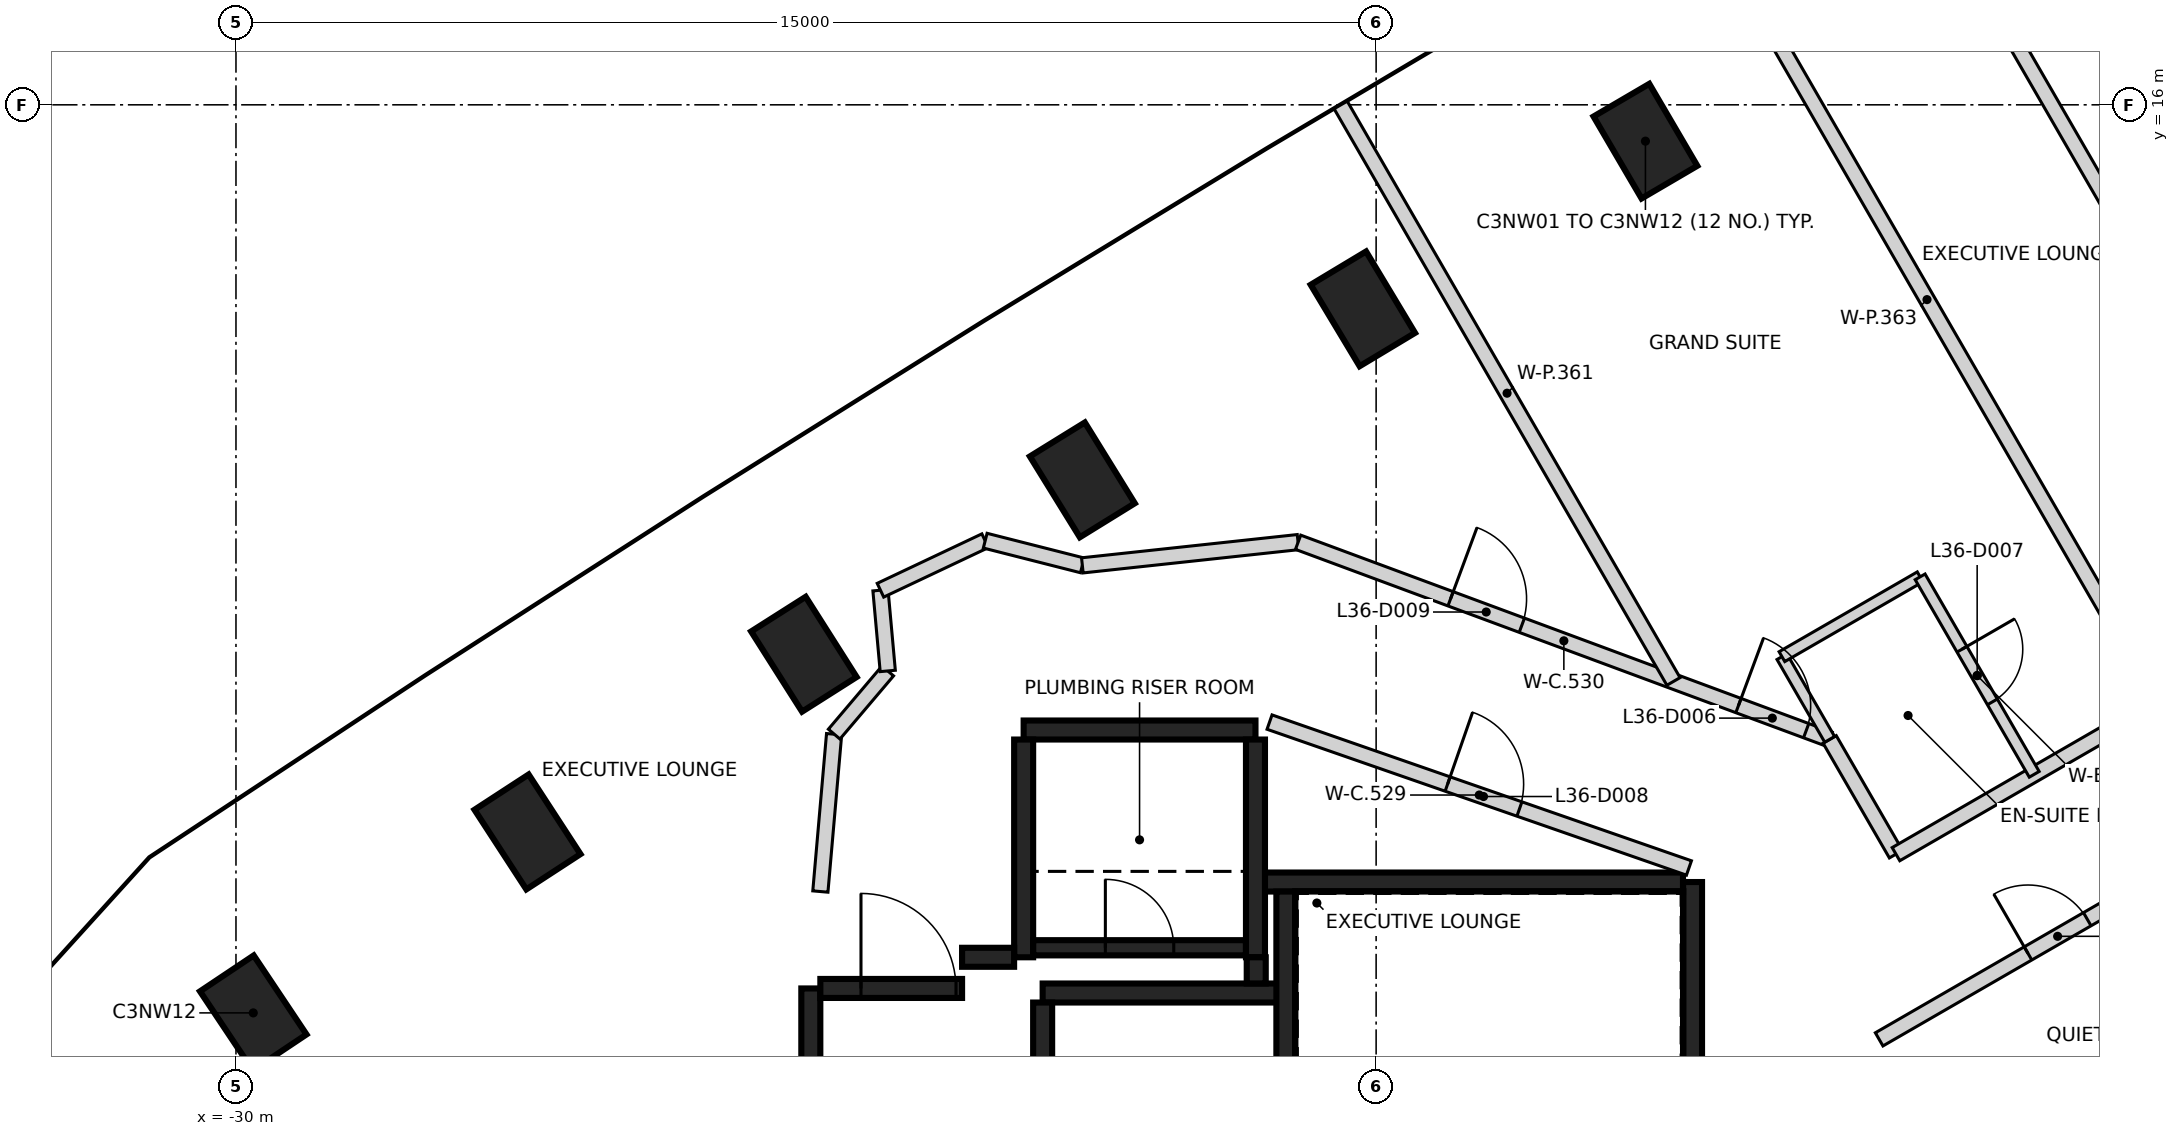
"""IFC4 building model, lengths in metres.
Left out: names, types, materials, properties, quantities, classifications, styles, units other than length and angle.
Written with IfcOpenShell. Run it as: python <this file> out.ifc"""

import sys

from ifc_helpers import new_model, si_unit, direction, frame, frame_2d, origin, origin_2d, place, context, subcontext, project, spatial, rectangle, extrude, element, fill, save


model = new_model("IFC4")
c1 = context("Model", 3, precision=1e-05, world=origin(), true_north=direction((0.0, 1.0)))
c2 = subcontext(c1, "Body", "Model", "MODEL_VIEW")
j1 = project(units=[si_unit("LENGTHUNIT", "METRE"), si_unit("PLANEANGLEUNIT", "RADIAN")], contexts=[c1])
p1 = place(None, origin())
s1 = spatial("IfcSite", under=j1, at=p1, CompositionType="ELEMENT")
p2 = place(p1, origin())
s2 = spatial("IfcBuilding", under=s1, at=p2, CompositionType="ELEMENT")
p3 = place(p2, frame((0.0, 0.0, 146.8)))
s3 = spatial("IfcBuildingStorey", under=s2, at=p3, CompositionType="ELEMENT", Elevation=146.8)
for number, where, z_axis, x_axis in (
    (1, (-11.457, 15.522, -0.4), (0.0, 0.0, 1.0), (-0.505, 0.863, 0.0)),
    (2, (-15.175, 13.316, -0.4), (0.0, 0.0, 1.0), (-0.515, 0.857, 0.0)),
    (3, (-18.865, 11.066, -0.4), (0.0, 0.0, 1.0), (-0.526, 0.851, 0.0)),
    (4, (-22.529, 8.772, -0.4), (0.0, 0.0, 1.0), (-0.536, 0.844, 0.0)),
    (5, (-26.165, 6.434, -0.4), (0.0, 0.0, 1.0), (-0.546, 0.838, 0.0)),
    (6, (-29.773, 4.053, -0.4), (0.0, 0.0, 1.0), (-0.556, 0.831, 0.0)),
):
    element("IfcColumn", number, at=place(p3, frame(where, z_axis=z_axis, x_axis=x_axis)), inside=s3, PredefinedType="COLUMN", context=c2, shape_type="SweptSolid", body=[
        extrude(rectangle(XDim=1.25, YDim=0.85, at=origin_2d()), origin(), (0.0, 0.0, 1.0), 3.6),
    ])
p4 = place(p3, frame((-10.837, 5.775, 0.0), z_axis=(0.0, 0.0, 1.0), x_axis=(0.0, -1.0, 0.0)))
e7 = element("IfcWall", 7, at=p4, inside=s3, PredefinedType="SHEAR", context=c2, shape_type="SweptSolid", body=[
    extrude(rectangle(XDim=11.55, YDim=0.25, at=frame_2d((5.775, 0.0))), origin(), (0.0, 0.0, 1.0), 3.2),
])
p5 = place(p4, frame((10.025, 0.0, 0.0)))
e8 = element("IfcOpeningElement", 8, at=p5, cuts=e7, PredefinedType="OPENING", context=c2, shape_type="SweptSolid", body=[
    extrude(rectangle(XDim=1.2, YDim=2.1, at=frame_2d((0.6, 1.05))), frame((0.0, 0.135, 0.0), z_axis=(0.0, -1.0, 0.0), x_axis=(1.0, 0.0, 0.0)), (0.0, 0.0, 1.0), 0.27),
])
p6 = place(p4, frame((8.725, 0.0, 0.0)))
e9 = element("IfcOpeningElement", 9, at=p6, cuts=e7, PredefinedType="OPENING", context=c2, shape_type="SweptSolid", body=[
    extrude(rectangle(XDim=1.2, YDim=2.1, at=frame_2d((0.6, 1.05))), frame((0.0, 0.135, 0.0), z_axis=(0.0, -1.0, 0.0), x_axis=(1.0, 0.0, 0.0)), (0.0, 0.0, 1.0), 0.27),
])
p7 = place(p3, frame((-16.472, 5.775, 0.0), z_axis=(0.0, 0.0, 1.0), x_axis=(1.0, 0.0, 0.0)))
e10 = element("IfcWall", 10, at=p7, inside=s3, PredefinedType="SHEAR", context=c2, shape_type="SweptSolid", body=[
    extrude(rectangle(XDim=5.51, YDim=0.25, at=frame_2d((2.755, 0.0))), origin(), (0.0, 0.0, 1.0), 3.2),
])
p8 = place(p3, frame((-19.637, 7.775, 0.0), z_axis=(0.0, 0.0, 1.0), x_axis=(1.0, 0.0, 0.0)))
e11 = element("IfcWall", 11, at=p8, inside=s3, PredefinedType="SHEAR", context=c2, shape_type="SweptSolid", body=[
    extrude(rectangle(XDim=3.05, YDim=0.25, at=frame_2d((1.525, 0.0))), origin(), (0.0, 0.0, 1.0), 3.2),
])
for number, where, z_axis, x_axis in (
    (12, (-16.587, 7.65, 0.0), (0.0, 0.0, 1.0), (0.0, -1.0, 0.0)),
    (13, (-19.637, 4.785, 0.0), (0.0, 0.0, 1.0), (0.0, 1.0, 0.0)),
):
    element("IfcWall", number, at=place(p3, frame(where, z_axis=z_axis, x_axis=x_axis)), inside=s3, PredefinedType="SHEAR", context=c2, shape_type="SweptSolid", body=[
        extrude(rectangle(XDim=2.865, YDim=0.25, at=frame_2d((1.432, 0.0))), origin(), (0.0, 0.0, 1.0), 3.2),
    ])
p9 = place(p3, frame((-16.302, 4.315, 0.0), z_axis=(0.0, 0.0, 1.0), x_axis=(-1.0, 0.0, 0.0)))
e14 = element("IfcWall", 14, at=p9, inside=s3, PredefinedType="SHEAR", context=c2, shape_type="SweptSolid", body=[
    extrude(rectangle(XDim=3.085, YDim=0.25, at=frame_2d((1.542, 0.0))), origin(), (0.0, 0.0, 1.0), 3.2),
])
p10 = place(p3, frame((-16.187, 3.2, 0.0), z_axis=(0.0, 0.0, 1.0), x_axis=(0.0, 1.0, 0.0)))
e15 = element("IfcWall", 15, at=p10, inside=s3, PredefinedType="SHEAR", context=c2, shape_type="SweptSolid", body=[
    extrude(rectangle(XDim=2.449, YDim=0.25, at=frame_2d((1.225, 0.0))), origin(), (0.0, 0.0, 1.0), 3.2),
])
p11 = place(p3, frame((-22.437, 2.4, 0.0), z_axis=(0.0, 0.0, 1.0), x_axis=(0.0, 1.0, 0.0)))
e16 = element("IfcWall", 16, at=p11, inside=s3, PredefinedType="SHEAR", context=c2, shape_type="SweptSolid", body=[
    extrude(rectangle(XDim=1.975, YDim=0.25, at=frame_2d((0.987, 0.0))), origin(), (0.0, 0.0, 1.0), 3.2),
])
p12 = place(p3, frame((-22.312, 4.375, 0.0), z_axis=(0.0, 0.0, 1.0), x_axis=(1.0, 0.0, 0.0)))
e17 = element("IfcWall", 17, at=p12, inside=s3, PredefinedType="SHEAR", context=c2, shape_type="SweptSolid", body=[
    extrude(rectangle(XDim=1.865, YDim=0.25, at=frame_2d((0.932, 0.0))), origin(), (0.0, 0.0, 1.0), 3.2),
])
p13 = place(p12, frame((0.535, 0.0, 0.0)))
e18 = element("IfcOpeningElement", 18, at=p13, cuts=e17, PredefinedType="OPENING", context=c2, shape_type="SweptSolid", body=[
    extrude(rectangle(XDim=1.25, YDim=2.1, at=frame_2d((0.625, 1.05))), frame((0.0, 0.135, 0.0), z_axis=(0.0, -1.0, 0.0), x_axis=(1.0, 0.0, 0.0)), (0.0, 0.0, 1.0), 0.27),
])
p14 = place(p3, frame((-19.387, 4.19, 0.0), z_axis=(0.0, 0.0, 1.0), x_axis=(0.0, -1.0, 0.0)))
e19 = element("IfcWall", 19, at=p14, inside=s3, PredefinedType="SHEAR", context=c2, shape_type="SweptSolid", body=[
    extrude(rectangle(XDim=0.989, YDim=0.25, at=frame_2d((0.495, 0.0))), origin(), (0.0, 0.0, 1.0), 3.2),
])
p15 = place(p3, frame((-20.447, 4.785, 0.0), z_axis=(0.0, 0.0, 1.0), x_axis=(1.0, 0.0, 0.0)))
e20 = element("IfcWall", 20, at=p15, inside=s3, PredefinedType="SHEAR", context=c2, shape_type="SweptSolid", body=[
    extrude(rectangle(XDim=0.685, YDim=0.25, at=frame_2d((0.342, 0.0))), origin(), (0.0, 0.0, 1.0), 3.2),
])
p16 = place(p3, frame((-16.577, 4.785, 0.0), z_axis=(0.0, 0.0, 1.0), x_axis=(0.0, -1.0, 0.0)))
e21 = element("IfcWall", 21, at=p16, inside=s3, PredefinedType="SHEAR", context=c2, shape_type="SweptSolid", body=[
    extrude(rectangle(XDim=0.344, YDim=0.25, at=frame_2d((0.172, 0.0))), origin(), (0.0, 0.0, 1.0), 3.2),
])
p17 = place(p3, frame((-19.511, 4.91, 0.0), z_axis=(0.0, 0.0, 1.0), x_axis=(1.0, 0.0, 0.0)))
e22 = element("IfcWall", 22, at=p17, inside=s3, PredefinedType="SHEAR", context=c2, shape_type="SweptSolid", body=[
    extrude(rectangle(XDim=2.798, YDim=0.2, at=frame_2d((1.399, 0.0))), origin(), (0.0, 0.0, 1.0), 3.2),
])
p18 = place(p17, frame((0.949, 0.0, 0.0)))
e23 = element("IfcOpeningElement", 23, at=p18, cuts=e22, PredefinedType="OPENING", context=c2, shape_type="SweptSolid", body=[
    extrude(rectangle(XDim=0.9, YDim=2.1, at=frame_2d((0.45, 1.05))), frame((0.0, 0.11, 0.0), z_axis=(0.0, -1.0, 0.0), x_axis=(1.0, 0.0, 0.0)), (0.0, 0.0, 1.0), 0.22),
])
p19 = place(p3, frame((-22.131, 7.72, 0.0), z_axis=(0.0, 0.0, 1.0), x_axis=(-0.086827346826, -0.996223374471, 0.0)))
e24 = element("IfcWall", 24, at=p19, inside=s3, PredefinedType="PARTITIONING", context=c2, shape_type="SweptSolid", body=[
    extrude(rectangle(XDim=2.078, YDim=0.2, at=frame_2d((1.039, 0.0))), origin(), (0.0, 0.0, 1.0), 3.2),
])
p20 = place(p3, frame((-22.13, 7.721, 0.0), z_axis=(0.0, 0.0, 1.0), x_axis=(0.646815590698, 0.762646439466, 0.0)))
e25 = element("IfcWall", 25, at=p20, inside=s3, PredefinedType="PARTITIONING", context=c2, shape_type="SweptSolid", body=[
    extrude(rectangle(XDim=1.09, YDim=0.2, at=frame_2d((0.545, 0.0))), origin(), (0.0, 0.0, 1.0), 3.2),
])
p21 = place(p3, frame((-21.521, 9.614, 0.0), z_axis=(0.0, 0.0, 1.0), x_axis=(0.089978363699, -0.995943720331, 0.0)))
e26 = element("IfcWall", 26, at=p21, inside=s3, PredefinedType="PARTITIONING", context=c2, shape_type="SweptSolid", body=[
    extrude(rectangle(XDim=1.066, YDim=0.2, at=frame_2d((0.533, 0.0))), origin(), (0.0, 0.0, 1.0), 2.3),
])
p22 = place(p3, frame((-21.521, 9.614, 0.0), z_axis=(0.0, 0.0, 1.0), x_axis=(0.904083527367, 0.427355795028, 0.0)))
e27 = element("IfcWall", 27, at=p22, inside=s3, PredefinedType="PARTITIONING", context=c2, shape_type="SweptSolid", body=[
    extrude(rectangle(XDim=1.523, YDim=0.2, at=frame_2d((0.761, 0.0))), origin(), (0.0, 0.0, 1.0), 2.3),
])
p23 = place(p3, frame((-20.143, 10.266, 0.0), z_axis=(0.0, 0.0, 1.0), x_axis=(0.969121308325, -0.246584447505, 0.0)))
e28 = element("IfcWall", 28, at=p23, inside=s3, PredefinedType="PARTITIONING", context=c2, shape_type="SweptSolid", body=[
    extrude(rectangle(XDim=1.319, YDim=0.2, at=frame_2d((0.659, 0.0))), origin(), (0.0, 0.0, 1.0), 2.3),
])
p24 = place(p3, frame((-18.865, 9.941, 0.0), z_axis=(0.0, 0.0, 1.0), x_axis=(0.99423123086, 0.107257911519, 0.0)))
e29 = element("IfcWall", 29, at=p24, inside=s3, PredefinedType="PARTITIONING", context=c2, shape_type="SweptSolid", body=[
    extrude(rectangle(XDim=2.854, YDim=0.2, at=frame_2d((1.427, 0.0))), origin(), (0.0, 0.0, 1.0), 3.2),
])
p25 = place(p3, frame((-16.402, 7.879, 0.0), z_axis=(0.0, 0.0, 1.0), x_axis=(0.94449961557, -0.328512520596, 0.0)))
e30 = element("IfcWall", 30, at=p25, inside=s3, PredefinedType="PARTITIONING", context=c2, shape_type="SweptSolid", body=[
    extrude(rectangle(XDim=5.842, YDim=0.2, at=frame_2d((2.921, 0.0))), origin(), (0.0, 0.0, 1.0), 3.2),
])
p26 = place(p25, frame((2.481, 0.0, 0.0)))
e31 = element("IfcOpeningElement", 31, at=p26, cuts=e30, PredefinedType="OPENING", context=c2, shape_type="SweptSolid", body=[
    extrude(rectangle(XDim=1.0, YDim=2.1, at=frame_2d((0.5, 1.05))), frame((0.0, 0.11, 0.0), z_axis=(0.0, -1.0, 0.0), x_axis=(1.0, 0.0, 0.0)), (0.0, 0.0, 1.0), 0.22),
])
p27 = place(p3, frame((-16.026, 10.245, 0.0), z_axis=(0.0, 0.0, 1.0), x_axis=(0.937607706988, -0.347694963721, 0.0)))
e32 = element("IfcWall", 32, at=p27, inside=s3, PredefinedType="PARTITIONING", context=c2, shape_type="SweptSolid", body=[
    extrude(rectangle(XDim=7.458, YDim=0.2, at=frame_2d((3.729, 0.0))), origin(), (0.0, 0.0, 1.0), 3.2),
])
p28 = place(p27, frame((6.179, 0.0, 0.0)))
e33 = element("IfcOpeningElement", 33, at=p28, cuts=e32, PredefinedType="OPENING", context=c2, shape_type="SweptSolid", body=[
    extrude(rectangle(XDim=0.95, YDim=2.1, at=frame_2d((0.475, 1.05))), frame((0.0, 0.11, 0.0), z_axis=(0.0, -1.0, 0.0), x_axis=(1.0, 0.0, 0.0)), (0.0, 0.0, 1.0), 0.22),
])
p29 = place(p27, frame((2.139, 0.0, 0.0)))
e34 = element("IfcOpeningElement", 34, at=p29, cuts=e32, PredefinedType="OPENING", context=c2, shape_type="SweptSolid", body=[
    extrude(rectangle(XDim=1.0, YDim=2.1, at=frame_2d((0.5, 1.05))), frame((0.0, 0.11, 0.0), z_axis=(0.0, -1.0, 0.0), x_axis=(1.0, 0.0, 0.0)), (0.0, 0.0, 1.0), 0.22),
])
p30 = place(p3, frame((-9.033, 7.651, 0.0), z_axis=(0.0, 0.0, 1.0), x_axis=(0.500417633986, -0.865784148386, 0.0)))
e35 = element("IfcWall", 35, at=p30, inside=s3, PredefinedType="PARTITIONING", context=c2, shape_type="SweptSolid", body=[
    extrude(rectangle(XDim=1.743, YDim=0.2, at=frame_2d((0.871, 0.0))), origin(), (0.0, 0.0, 1.0), 3.2),
])
p31 = place(p3, frame((-8.382, 3.705, 0.0), z_axis=(0.0, 0.0, 1.0), x_axis=(0.866012036978, 0.500023151273, 0.0)))
e36 = element("IfcWall", 36, at=p31, inside=s3, PredefinedType="PARTITIONING", context=c2, shape_type="SweptSolid", body=[
    extrude(rectangle(XDim=10.823, YDim=0.2, at=frame_2d((5.412, 0.0))), origin(), (0.0, 0.0, 1.0), 3.2),
])
p32 = place(p31, frame((7.661, 0.0, 0.0)))
e37 = element("IfcOpeningElement", 37, at=p32, cuts=e36, PredefinedType="OPENING", context=c2, shape_type="SweptSolid", body=[
    extrude(rectangle(XDim=0.9, YDim=2.1, at=frame_2d((0.45, 1.05))), frame((0.0, 0.11, 0.0), z_axis=(0.0, -1.0, 0.0), x_axis=(1.0, 0.0, 0.0)), (0.0, 0.0, 1.0), 0.22),
])
p33 = place(p31, frame((2.261, 0.0, 0.0)))
e38 = element("IfcOpeningElement", 38, at=p33, cuts=e36, PredefinedType="OPENING", context=c2, shape_type="SweptSolid", body=[
    extrude(rectangle(XDim=0.9, YDim=2.1, at=frame_2d((0.45, 1.05))), frame((0.0, 0.11, 0.0), z_axis=(0.0, -1.0, 0.0), x_axis=(1.0, 0.0, 0.0)), (0.0, 0.0, 1.0), 0.22),
])
p34 = place(p3, frame((-8.161, 6.142, 0.0), z_axis=(0.0, 0.0, 1.0), x_axis=(0.865927304867, 0.500169873828, 0.0)))
e39 = element("IfcWall", 39, at=p34, inside=s3, PredefinedType="PARTITIONING", context=c2, shape_type="SweptSolid", body=[
    extrude(rectangle(XDim=9.478, YDim=0.2, at=frame_2d((4.739, 0.0))), origin(), (0.0, 0.0, 1.0), 3.2),
])
p35 = place(p34, frame((4.851, 0.0, 0.0)))
e40 = element("IfcOpeningElement", 40, at=p35, cuts=e39, PredefinedType="OPENING", context=c2, shape_type="SweptSolid", body=[
    extrude(rectangle(XDim=1.0, YDim=2.1, at=frame_2d((0.5, 1.05))), frame((0.0, 0.11, 0.0), z_axis=(0.0, -1.0, 0.0), x_axis=(1.0, 0.0, 0.0)), (0.0, 0.0, 1.0), 0.22),
])
p36 = place(p34, frame((7.583, 0.0, 0.0)))
e41 = element("IfcOpeningElement", 41, at=p36, cuts=e39, PredefinedType="OPENING", context=c2, shape_type="SweptSolid", body=[
    extrude(rectangle(XDim=1.0, YDim=2.1, at=frame_2d((0.5, 1.05))), frame((0.0, 0.11, 0.0), z_axis=(0.0, -1.0, 0.0), x_axis=(1.0, 0.0, 0.0)), (0.0, 0.0, 1.0), 0.22),
])
p37 = place(p3, frame((-15.467, 15.998, 0.0), z_axis=(0.0, 0.0, 1.0), x_axis=(0.500003998589, -0.866023095186, 0.0)))
e42 = element("IfcWall", 42, at=p37, inside=s3, PredefinedType="PARTITIONING", context=c2, shape_type="SweptSolid", body=[
    extrude(rectangle(XDim=8.757, YDim=0.2, at=frame_2d((4.379, 0.0))), origin(), (0.0, 0.0, 1.0), 2.3),
])
p38 = place(p3, frame((-10.809, 18.731, 0.0), z_axis=(0.0, 0.0, 1.0), x_axis=(0.500004774777, -0.866022647048, 0.0)))
e43 = element("IfcWall", 43, at=p38, inside=s3, PredefinedType="PARTITIONING", context=c2, shape_type="SweptSolid", body=[
    extrude(rectangle(XDim=12.227, YDim=0.2, at=frame_2d((6.113, 0.0))), origin(), (0.0, 0.0, 1.0), 2.3),
])
p39 = place(p3, frame((-8.468, 20.076, 0.0), z_axis=(0.0, 0.0, 1.0), x_axis=(0.499961688474, -0.866047521824, 0.0)))
e44 = element("IfcWall", 44, at=p39, inside=s3, PredefinedType="PARTITIONING", context=c2, shape_type="SweptSolid", body=[
    extrude(rectangle(XDim=12.22, YDim=0.2, at=frame_2d((6.11, 0.0))), origin(), (0.0, 0.0, 1.0), 2.3),
])
p40 = place(p3, frame((-7.082, 1.453, 0.0), z_axis=(0.0, 0.0, 1.0), x_axis=(0.866010525116, 0.500025769724, 0.0)))
e45 = element("IfcWall", 45, at=p40, inside=s3, PredefinedType="PARTITIONING", context=c2, shape_type="SweptSolid", body=[
    extrude(rectangle(XDim=10.823, YDim=0.2, at=frame_2d((5.411, 0.0))), origin(), (0.0, 0.0, 1.0), 2.3),
])
p41 = place(p3, frame((-9.661, 8.74, 0.0), z_axis=(0.0, 0.0, 1.0), x_axis=(0.49990192124, -0.866082022179, 0.0)))
e46 = element("IfcWall", 46, at=p41, inside=s3, PredefinedType="PARTITIONING", context=c2, shape_type="SweptSolid", body=[
    extrude(rectangle(XDim=1.256, YDim=0.15, at=frame_2d((0.628, 0.0))), origin(), (0.0, 0.0, 1.0), 3.2),
])
p42 = place(p3, frame((-9.661, 8.74, 0.0), z_axis=(0.0, 0.0, 1.0), x_axis=(0.865922159541, 0.500178781653, 0.0)))
e47 = element("IfcWall", 47, at=p42, inside=s3, PredefinedType="PARTITIONING", context=c2, shape_type="SweptSolid", body=[
    extrude(rectangle(XDim=2.099, YDim=0.15, at=frame_2d((1.05, 0.0))), origin(), (0.0, 0.0, 1.0), 3.2),
])
p43 = place(p3, frame((-7.843, 9.79, 0.0), z_axis=(0.0, 0.0, 1.0), x_axis=(0.500234218456, -0.865890135459, 0.0)))
e48 = element("IfcWall", 48, at=p43, inside=s3, PredefinedType="PARTITIONING", context=c2, shape_type="SweptSolid", body=[
    extrude(rectangle(XDim=3.0, YDim=0.15, at=frame_2d((1.5, 0.0))), origin(), (0.0, 0.0, 1.0), 3.2),
])
p44 = place(p43, frame((1.1, 0.0, 0.0)))
e49 = element("IfcOpeningElement", 49, at=p44, cuts=e48, PredefinedType="OPENING", context=c2, shape_type="SweptSolid", body=[
    extrude(rectangle(XDim=0.8, YDim=2.1, at=frame_2d((0.4, 1.05))), frame((0.0, 0.085, 0.0), z_axis=(0.0, -1.0, 0.0), x_axis=(1.0, 0.0, 0.0)), (0.0, 0.0, 1.0), 0.17),
])
p45 = place(p13, origin())
e50 = element("IfcDoor", 50, at=p45, inside=s3, OperationType="SINGLE_SWING_LEFT", PredefinedType="DOOR", context=c2, shape_type="SweptSolid", body=[
    extrude(rectangle(XDim=1.25, YDim=2.1, at=frame_2d((0.625, 1.05))), frame((0.0, 0.025, 0.0), z_axis=(0.0, -1.0, 0.0), x_axis=(1.0, 0.0, 0.0)), (0.0, 0.0, 1.0), 0.05),
])
fill(e18, e50)
p46 = place(p18, origin())
e51 = element("IfcDoor", 51, at=p46, inside=s3, OperationType="SINGLE_SWING_LEFT", PredefinedType="DOOR", context=c2, shape_type="SweptSolid", body=[
    extrude(rectangle(XDim=0.9, YDim=2.1, at=frame_2d((0.45, 1.05))), frame((0.0, 0.025, 0.0), z_axis=(0.0, -1.0, 0.0), x_axis=(1.0, 0.0, 0.0)), (0.0, 0.0, 1.0), 0.05),
])
fill(e23, e51)
p47 = place(p28, origin())
e52 = element("IfcDoor", 52, at=p47, inside=s3, OperationType="SINGLE_SWING_LEFT", PredefinedType="DOOR", context=c2, shape_type="SweptSolid", body=[
    extrude(rectangle(XDim=0.95, YDim=2.1, at=frame_2d((0.475, 1.05))), frame((0.0, 0.025, 0.0), z_axis=(0.0, -1.0, 0.0), x_axis=(1.0, 0.0, 0.0)), (0.0, 0.0, 1.0), 0.05),
])
fill(e33, e52)
p48 = place(p44, frame((0.8, 0.0, 0.0), z_axis=(0.0, 0.0, 1.0), x_axis=(-1.0, 0.0, 0.0)))
e53 = element("IfcDoor", 53, at=p48, inside=s3, OperationType="SINGLE_SWING_LEFT", PredefinedType="DOOR", context=c2, shape_type="SweptSolid", body=[
    extrude(rectangle(XDim=0.8, YDim=2.1, at=frame_2d((0.4, 1.05))), frame((0.0, 0.025, 0.0), z_axis=(0.0, -1.0, 0.0), x_axis=(1.0, 0.0, 0.0)), (0.0, 0.0, 1.0), 0.05),
])
fill(e49, e53)
p49 = place(p26, frame((1.0, 0.0, 0.0), z_axis=(0.0, 0.0, 1.0), x_axis=(-1.0, 0.0, 0.0)))
e54 = element("IfcDoor", 54, at=p49, inside=s3, OperationType="SINGLE_SWING_LEFT", PredefinedType="DOOR", context=c2, shape_type="SweptSolid", body=[
    extrude(rectangle(XDim=1.0, YDim=2.1, at=frame_2d((0.5, 1.05))), frame((0.0, 0.025, 0.0), z_axis=(0.0, -1.0, 0.0), x_axis=(1.0, 0.0, 0.0)), (0.0, 0.0, 1.0), 0.05),
])
fill(e31, e54)
p50 = place(p29, frame((1.0, 0.0, 0.0), z_axis=(0.0, 0.0, 1.0), x_axis=(-1.0, 0.0, 0.0)))
e55 = element("IfcDoor", 55, at=p50, inside=s3, OperationType="SINGLE_SWING_LEFT", PredefinedType="DOOR", context=c2, shape_type="SweptSolid", body=[
    extrude(rectangle(XDim=1.0, YDim=2.1, at=frame_2d((0.5, 1.05))), frame((0.0, 0.025, 0.0), z_axis=(0.0, -1.0, 0.0), x_axis=(1.0, 0.0, 0.0)), (0.0, 0.0, 1.0), 0.05),
])
fill(e34, e55)
p51 = place(p33, frame((0.9, 0.0, 0.0), z_axis=(0.0, 0.0, 1.0), x_axis=(-1.0, 0.0, 0.0)))
e56 = element("IfcDoor", 56, at=p51, inside=s3, OperationType="SINGLE_SWING_LEFT", PredefinedType="DOOR", context=c2, shape_type="SweptSolid", body=[
    extrude(rectangle(XDim=0.9, YDim=2.1, at=frame_2d((0.45, 1.05))), frame((0.0, 0.025, 0.0), z_axis=(0.0, -1.0, 0.0), x_axis=(1.0, 0.0, 0.0)), (0.0, 0.0, 1.0), 0.05),
])
fill(e38, e56)
save(model, sys.argv[1])
